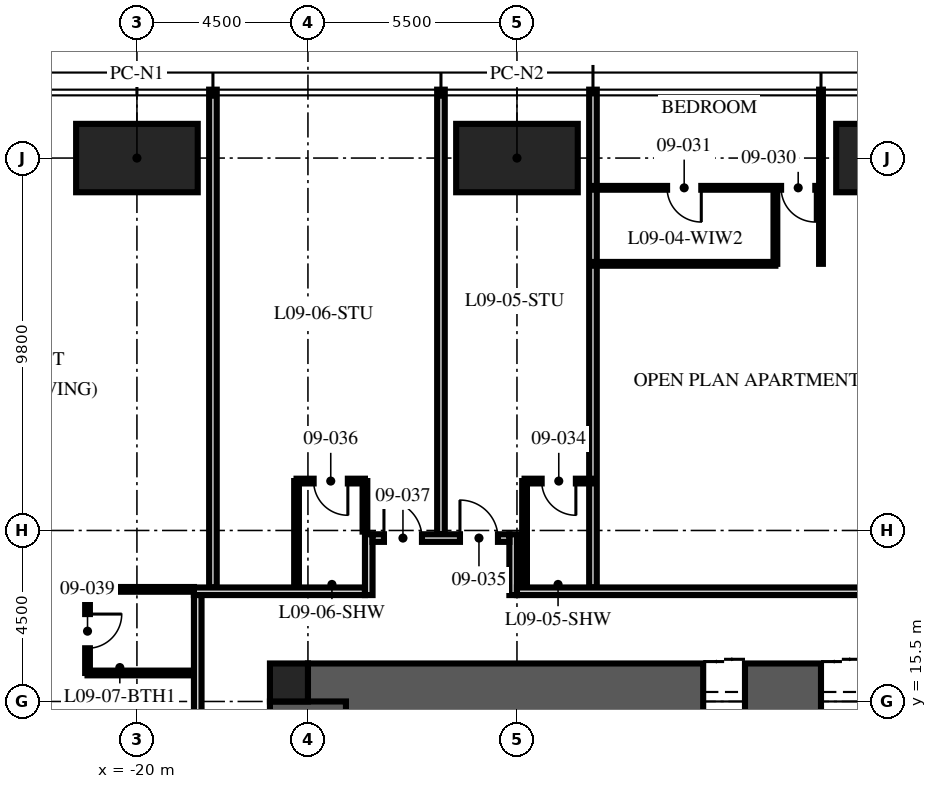
"""IFC4 building model, lengths in metres.
Left out: names, types, materials, properties, quantities, classifications, styles, units other than length and angle.
Written with IfcOpenShell. Run it as: python <this file> out.ifc"""

import sys

from ifc_helpers import new_model, si_unit, direction, frame, frame_2d, origin, origin_2d, place, context, subcontext, project, spatial, rectangle, hollow_rectangle, extrude, element, fill, save


model = new_model("IFC4")
c1 = context("Model", 3, precision=1e-05, world=origin(), true_north=direction((0.0, 1.0)))
c2 = subcontext(c1, "Body", "Model", "MODEL_VIEW")
j1 = project(units=[si_unit("LENGTHUNIT", "METRE"), si_unit("PLANEANGLEUNIT", "RADIAN")], contexts=[c1])
p1 = place(None, origin())
s1 = spatial("IfcSite", under=j1, at=p1, CompositionType="ELEMENT")
p2 = place(p1, origin())
s2 = spatial("IfcBuilding", under=s1, at=p2, CompositionType="ELEMENT")
p3 = place(p2, frame((0.0, 0.0, 39.75)))
s3 = spatial("IfcBuildingStorey", under=s2, at=p3, CompositionType="ELEMENT", Elevation=39.75)
p4 = place(p3, frame((-15.5, 15.5, -0.25), z_axis=(0.0, 0.0, 1.0), x_axis=(1.0, 0.0, 0.0)))
e1 = element("IfcWall", 1, at=p4, inside=s3, PredefinedType="SHEAR", context=c2, shape_type="SweptSolid", body=[
    extrude(rectangle(XDim=31.0, YDim=2.0, at=frame_2d((15.5, 0.0))), origin(), (0.0, 0.0, 1.0), 3.75),
])
p5 = place(p4, frame((10.4, 0.0, 0.25)))
e2 = element("IfcOpeningElement", 2, at=p5, cuts=e1, PredefinedType="OPENING", context=c2, shape_type="SweptSolid", body=[
    extrude(rectangle(XDim=1.1, YDim=2.1, at=frame_2d((0.55, 1.05))), frame((0.0, 1.01, 0.0), z_axis=(0.0, -1.0, 0.0), x_axis=(1.0, 0.0, 0.0)), (0.0, 0.0, 1.0), 2.02),
])
p6 = place(p4, frame((13.5, 0.0, 0.25)))
e3 = element("IfcOpeningElement", 3, at=p6, cuts=e1, PredefinedType="OPENING", context=c2, shape_type="SweptSolid", body=[
    extrude(rectangle(XDim=1.1, YDim=2.1, at=frame_2d((0.55, 1.05))), frame((0.0, 1.01, 0.0), z_axis=(0.0, -1.0, 0.0), x_axis=(1.0, 0.0, 0.0)), (0.0, 0.0, 1.0), 2.02),
])
p7 = place(p4, frame((16.6, 0.0, 0.25)))
e4 = element("IfcOpeningElement", 4, at=p7, cuts=e1, PredefinedType="OPENING", context=c2, shape_type="SweptSolid", body=[
    extrude(rectangle(XDim=1.1, YDim=2.1, at=frame_2d((0.55, 1.05))), frame((0.0, 1.01, 0.0), z_axis=(0.0, -1.0, 0.0), x_axis=(1.0, 0.0, 0.0)), (0.0, 0.0, 1.0), 2.02),
])
p8 = place(p3, frame((-15.5, -15.5, -0.25), z_axis=(0.0, 0.0, 1.0), x_axis=(0.0, 1.0, 0.0)))
e5 = element("IfcWall", 5, at=p8, inside=s3, PredefinedType="SHEAR", context=c2, shape_type="SweptSolid", body=[
    extrude(rectangle(XDim=31.0, YDim=2.0, at=frame_2d((15.5, 0.0))), origin(), (0.0, 0.0, 1.0), 3.75),
])
p9 = place(p8, frame((6.5, 0.0, 0.25)))
e6 = element("IfcOpeningElement", 6, at=p9, cuts=e5, PredefinedType="OPENING", context=c2, shape_type="SweptSolid", body=[
    extrude(rectangle(XDim=1.2, YDim=2.1, at=frame_2d((0.6, 1.05))), frame((0.0, 1.01, 0.0), z_axis=(0.0, -1.0, 0.0), x_axis=(1.0, 0.0, 0.0)), (0.0, 0.0, 1.0), 2.02),
])
p10 = place(p8, frame((23.0, 0.0, 0.25)))
e7 = element("IfcOpeningElement", 7, at=p10, cuts=e5, PredefinedType="OPENING", context=c2, shape_type="SweptSolid", body=[
    extrude(rectangle(XDim=1.8, YDim=2.1, at=frame_2d((0.9, 1.05))), frame((0.0, 1.01, 0.0), z_axis=(0.0, -1.0, 0.0), x_axis=(1.0, 0.0, 0.0)), (0.0, 0.0, 1.0), 2.02),
])
p11 = place(p3, frame((-16.0, 16.0, -0.25), z_axis=(0.0, 0.0, 1.0), x_axis=(1.0, 0.0, 0.0)))
e8 = element("IfcColumn", 8, at=p11, inside=s3, PredefinedType="COLUMN", context=c2, shape_type="SweptSolid", body=[
    extrude(rectangle(XDim=1.0, YDim=1.0, at=origin_2d()), origin(), (0.0, 0.0, 1.0), 3.75),
])
for number, where, z_axis, x_axis in (
    (9, (-20.0, 29.8, 0.0), (0.0, 0.0, 1.0), (1.0, 0.0, 0.0)),
    (10, (-10.0, 29.8, 0.0), (0.0, 0.0, 1.0), (1.0, 0.0, 0.0)),
    (11, (0.0, 29.8, 0.0), (0.0, 0.0, 1.0), (1.0, 0.0, 0.0)),
):
    element("IfcColumn", number, at=place(p3, frame(where, z_axis=z_axis, x_axis=x_axis)), inside=s3, PredefinedType="COLUMN", context=c2, shape_type="SweptSolid", body=[
        extrude(hollow_rectangle(XDim=3.2, YDim=1.8, WallThickness=0.2, at=origin_2d()), origin(), (0.0, 0.0, 1.0), 3.75),
    ])
p12 = place(p3, frame((-2.0, 27.017, 0.0), z_axis=(0.0, 0.0, 1.0), x_axis=(0.0, 1.0, 0.0)))
e12 = element("IfcWall", 12, at=p12, inside=s3, PredefinedType="PARTITIONING", context=c2, shape_type="SweptSolid", body=[
    extrude(rectangle(XDim=4.583, YDim=0.1, at=frame_2d((2.292, 0.0))), origin(), (0.0, 0.0, 1.0), 2.71),
])
p13 = place(p3, frame((-8.0, 18.5, 0.0), z_axis=(0.0, 0.0, 1.0), x_axis=(0.0, 1.0, 0.0)))
e13 = element("IfcWall", 13, at=p13, inside=s3, PredefinedType="PARTITIONING", context=c2, shape_type="SweptSolid", body=[
    extrude(rectangle(XDim=13.1, YDim=0.2, at=frame_2d((6.55, 0.0))), origin(), (0.0, 0.0, 1.0), 2.71),
])
p14 = place(p3, frame((-12.0, 19.9, 0.0), z_axis=(0.0, 0.0, 1.0), x_axis=(0.0, 1.0, 0.0)))
e14 = element("IfcWall", 14, at=p14, inside=s3, PredefinedType="PARTITIONING", context=c2, shape_type="SweptSolid", body=[
    extrude(rectangle(XDim=11.7, YDim=0.2, at=frame_2d((5.85, 0.0))), origin(), (0.0, 0.0, 1.0), 2.71),
])
p15 = place(p3, frame((-18.0, 18.5, 0.0), z_axis=(0.0, 0.0, 1.0), x_axis=(0.0, 1.0, 0.0)))
e15 = element("IfcWall", 15, at=p15, inside=s3, PredefinedType="PARTITIONING", context=c2, shape_type="SweptSolid", body=[
    extrude(rectangle(XDim=13.1, YDim=0.2, at=frame_2d((6.55, 0.0))), origin(), (0.0, 0.0, 1.0), 2.3),
])
p16 = place(p3, frame((-2.0, 29.017, 0.0), z_axis=(0.0, 0.0, 1.0), x_axis=(-1.0, 0.0, 0.0)))
e16 = element("IfcWall", 16, at=p16, inside=s3, PredefinedType="PARTITIONING", context=c2, shape_type="SweptSolid", body=[
    extrude(rectangle(XDim=6.0, YDim=0.1, at=frame_2d((3.0, 0.0))), origin(), (0.0, 0.0, 1.0), 2.61),
])
p17 = place(p16, frame((0.15, 0.0, 0.0)))
e17 = element("IfcOpeningElement", 17, at=p17, cuts=e16, PredefinedType="OPENING", context=c2, shape_type="SweptSolid", body=[
    extrude(rectangle(XDim=0.9, YDim=2.1, at=frame_2d((0.45, 1.05))), frame((0.0, 0.06, 0.0), z_axis=(0.0, -1.0, 0.0), x_axis=(1.0, 0.0, 0.0)), (0.0, 0.0, 1.0), 0.12),
])
p18 = place(p16, frame((3.15, 0.0, 0.0)))
e18 = element("IfcOpeningElement", 18, at=p18, cuts=e16, PredefinedType="OPENING", context=c2, shape_type="SweptSolid", body=[
    extrude(rectangle(XDim=0.9, YDim=2.1, at=frame_2d((0.45, 1.05))), frame((0.0, 0.06, 0.0), z_axis=(0.0, -1.0, 0.0), x_axis=(1.0, 0.0, 0.0)), (0.0, 0.0, 1.0), 0.12),
])
p19 = place(p3, frame((-3.2, 27.017, 0.0), z_axis=(0.0, 0.0, 1.0), x_axis=(0.0, 1.0, 0.0)))
e19 = element("IfcWall", 19, at=p19, inside=s3, PredefinedType="PARTITIONING", context=c2, shape_type="SweptSolid", body=[
    extrude(rectangle(XDim=2.0, YDim=0.1, at=frame_2d((1.0, 0.0))), origin(), (0.0, 0.0, 1.0), 3.5),
])
p20 = place(p3, frame((-3.2, 27.017, 0.0), z_axis=(0.0, 0.0, 1.0), x_axis=(-1.0, 0.0, 0.0)))
e20 = element("IfcWall", 20, at=p20, inside=s3, PredefinedType="PARTITIONING", context=c2, shape_type="SweptSolid", body=[
    extrude(rectangle(XDim=4.8, YDim=0.1, at=frame_2d((2.4, 0.0))), origin(), (0.0, 0.0, 1.0), 2.61),
])
p21 = place(p3, frame((-8.0, 21.3, 0.0), z_axis=(0.0, 0.0, 1.0), x_axis=(-1.0, 0.0, 0.0)))
e21 = element("IfcWall", 21, at=p21, inside=s3, PredefinedType="PARTITIONING", context=c2, shape_type="SweptSolid", body=[
    extrude(rectangle(XDim=1.8, YDim=0.125, at=frame_2d((0.9, 0.0))), origin(), (0.0, 0.0, 1.0), 3.5),
])
p22 = place(p21, frame((0.45, 0.0, 0.0)))
e22 = element("IfcOpeningElement", 22, at=p22, cuts=e21, PredefinedType="OPENING", context=c2, shape_type="SweptSolid", body=[
    extrude(rectangle(XDim=0.9, YDim=2.1, at=frame_2d((0.45, 1.05))), frame((0.0, 0.073, 0.0), z_axis=(0.0, -1.0, 0.0), x_axis=(1.0, 0.0, 0.0)), (0.0, 0.0, 1.0), 0.145),
])
p23 = place(p3, frame((-9.8, 18.5, 0.0), z_axis=(0.0, 0.0, 1.0), x_axis=(0.0, 1.0, 0.0)))
e23 = element("IfcWall", 23, at=p23, inside=s3, PredefinedType="PARTITIONING", context=c2, shape_type="SweptSolid", body=[
    extrude(rectangle(XDim=2.8, YDim=0.125, at=frame_2d((1.4, 0.0))), origin(), (0.0, 0.0, 1.0), 2.492),
])
p24 = place(p3, frame((-14.0, 21.3, 0.0), z_axis=(0.0, 0.0, 1.0), x_axis=(-1.0, 0.0, 0.0)))
e24 = element("IfcWall", 24, at=p24, inside=s3, PredefinedType="PARTITIONING", context=c2, shape_type="SweptSolid", body=[
    extrude(rectangle(XDim=1.8, YDim=0.125, at=frame_2d((0.9, 0.0))), origin(), (0.0, 0.0, 1.0), 2.61),
])
p25 = place(p24, frame((0.45, 0.0, 0.0)))
e25 = element("IfcOpeningElement", 25, at=p25, cuts=e24, PredefinedType="OPENING", context=c2, shape_type="SweptSolid", body=[
    extrude(rectangle(XDim=0.9, YDim=2.1, at=frame_2d((0.45, 1.05))), frame((0.0, 0.073, 0.0), z_axis=(0.0, -1.0, 0.0), x_axis=(1.0, 0.0, 0.0)), (0.0, 0.0, 1.0), 0.145),
])
p26 = place(p3, frame((-14.0, 19.97, 0.0), z_axis=(0.0, 0.0, 1.0), x_axis=(0.0, 1.0, 0.0)))
e26 = element("IfcWall", 26, at=p26, inside=s3, PredefinedType="PARTITIONING", context=c2, shape_type="SweptSolid", body=[
    extrude(rectangle(XDim=1.33, YDim=0.125, at=frame_2d((0.665, 0.0))), origin(), (0.0, 0.0, 1.0), 3.5),
])
p27 = place(p3, frame((-15.8, 18.5, 0.0), z_axis=(0.0, 0.0, 1.0), x_axis=(0.0, 1.0, 0.0)))
e27 = element("IfcWall", 27, at=p27, inside=s3, PredefinedType="PARTITIONING", context=c2, shape_type="SweptSolid", body=[
    extrude(rectangle(XDim=2.8, YDim=0.125, at=frame_2d((1.4, 0.0))), origin(), (0.0, 0.0, 1.0), 3.5),
])
p28 = place(p3, frame((-21.3, 18.45, 0.0), z_axis=(0.0, 0.0, 1.0), x_axis=(0.0, -1.0, 0.0)))
e28 = element("IfcWall", 28, at=p28, inside=s3, PredefinedType="PARTITIONING", context=c2, shape_type="SweptSolid", body=[
    extrude(rectangle(XDim=2.2, YDim=0.125, at=frame_2d((1.1, 0.0))), origin(), (0.0, 0.0, 1.0), 3.5),
])
p29 = place(p28, frame((0.65, 0.0, 0.0)))
e29 = element("IfcOpeningElement", 29, at=p29, cuts=e28, PredefinedType="OPENING", context=c2, shape_type="SweptSolid", body=[
    extrude(rectangle(XDim=0.9, YDim=2.1, at=frame_2d((0.45, 1.05))), frame((0.0, 0.073, 0.0), z_axis=(0.0, -1.0, 0.0), x_axis=(1.0, 0.0, 0.0)), (0.0, 0.0, 1.0), 0.145),
])
p30 = place(p3, frame((-18.5, 18.45, 0.0), z_axis=(0.0, 0.0, 1.0), x_axis=(-1.0, 0.0, 0.0)))
e30 = element("IfcWall", 30, at=p30, inside=s3, PredefinedType="PARTITIONING", context=c2, shape_type="SweptSolid", body=[
    extrude(rectangle(XDim=2.8, YDim=0.125, at=frame_2d((1.4, 0.0))), origin(), (0.0, 0.0, 1.0), 2.3),
])
p31 = place(p3, frame((-18.5, 16.25, 0.0), z_axis=(0.0, 0.0, 1.0), x_axis=(-1.0, 0.0, 0.0)))
e31 = element("IfcWall", 31, at=p31, inside=s3, PredefinedType="PARTITIONING", context=c2, shape_type="SweptSolid", body=[
    extrude(rectangle(XDim=2.8, YDim=0.125, at=frame_2d((1.4, 0.0))), origin(), (0.0, 0.0, 1.0), 3.5),
])
p32 = place(p3, frame((-18.5, 18.4, 0.0), z_axis=(0.0, 0.0, 1.0), x_axis=(1.0, 0.0, 0.0)))
e32 = element("IfcWall", 32, at=p32, inside=s3, PredefinedType="PARTITIONING", context=c2, shape_type="SweptSolid", body=[
    extrude(rectangle(XDim=4.5, YDim=0.2, at=frame_2d((2.25, 0.0))), origin(), (0.0, 0.0, 1.0), 2.3),
])
p33 = place(p3, frame((-13.9, 18.3, 0.0), z_axis=(0.0, 0.0, 1.0), x_axis=(0.0, 1.0, 0.0)))
e33 = element("IfcWall", 33, at=p33, inside=s3, PredefinedType="PARTITIONING", context=c2, shape_type="SweptSolid", body=[
    extrude(rectangle(XDim=1.6, YDim=0.2, at=frame_2d((0.8, 0.0))), origin(), (0.0, 0.0, 1.0), 3.5),
])
p34 = place(p3, frame((-10.1, 18.3, 0.0), z_axis=(0.0, 0.0, 1.0), x_axis=(0.0, 1.0, 0.0)))
e34 = element("IfcWall", 34, at=p34, inside=s3, PredefinedType="PARTITIONING", context=c2, shape_type="SweptSolid", body=[
    extrude(rectangle(XDim=1.6, YDim=0.2, at=frame_2d((0.8, 0.0))), origin(), (0.0, 0.0, 1.0), 2.492),
])
p35 = place(p3, frame((-13.8, 19.8, 0.0), z_axis=(0.0, 0.0, 1.0), x_axis=(1.0, 0.0, 0.0)))
e35 = element("IfcWall", 35, at=p35, inside=s3, PredefinedType="PARTITIONING", context=c2, shape_type="SweptSolid", body=[
    extrude(rectangle(XDim=3.6, YDim=0.2, at=frame_2d((1.8, 0.0))), origin(), (0.0, 0.0, 1.0), 3.5),
])
p36 = place(p35, frame((2.3, 0.0, 0.0)))
e36 = element("IfcOpeningElement", 36, at=p36, cuts=e35, PredefinedType="OPENING", context=c2, shape_type="SweptSolid", body=[
    extrude(rectangle(XDim=1.0, YDim=2.2, at=frame_2d((0.5, 1.1))), frame((0.0, 0.11, 0.0), z_axis=(0.0, -1.0, 0.0), x_axis=(1.0, 0.0, 0.0)), (0.0, 0.0, 1.0), 0.22),
])
p37 = place(p35, frame((0.3, 0.0, 0.0)))
e37 = element("IfcOpeningElement", 37, at=p37, cuts=e35, PredefinedType="OPENING", context=c2, shape_type="SweptSolid", body=[
    extrude(rectangle(XDim=1.0, YDim=2.2, at=frame_2d((0.5, 1.1))), frame((0.0, 0.11, 0.0), z_axis=(0.0, -1.0, 0.0), x_axis=(1.0, 0.0, 0.0)), (0.0, 0.0, 1.0), 0.22),
])
p38 = place(p3, frame((-10.0, 18.4, 0.0), z_axis=(0.0, 0.0, 1.0), x_axis=(1.0, 0.0, 0.0)))
e38 = element("IfcWall", 38, at=p38, inside=s3, PredefinedType="PARTITIONING", context=c2, shape_type="SweptSolid", body=[
    extrude(rectangle(XDim=16.0, YDim=0.2, at=frame_2d((8.0, 0.0))), origin(), (0.0, 0.0, 1.0), 2.492),
])
p39 = place(p3, frame((-18.4, 18.3, 0.0), z_axis=(0.0, 0.0, 1.0), x_axis=(0.0, -1.0, 0.0)))
e39 = element("IfcWall", 39, at=p39, inside=s3, PredefinedType="PARTITIONING", context=c2, shape_type="SweptSolid", body=[
    extrude(rectangle(XDim=36.6, YDim=0.2, at=frame_2d((18.3, 0.0))), origin(), (0.0, 0.0, 1.0), 2.3),
])
p40 = place(p39, frame((8.7, 0.0, 0.0)))
e40 = element("IfcOpeningElement", 40, at=p40, cuts=e39, PredefinedType="OPENING", context=c2, shape_type="SweptSolid", body=[
    extrude(rectangle(XDim=1.0, YDim=2.2, at=frame_2d((0.5, 1.1))), frame((0.0, 0.11, 0.0), z_axis=(0.0, -1.0, 0.0), x_axis=(1.0, 0.0, 0.0)), (0.0, 0.0, 1.0), 0.22),
])
p41 = place(p39, frame((14.87, 0.0, 0.0)))
e41 = element("IfcOpeningElement", 41, at=p41, cuts=e39, PredefinedType="OPENING", context=c2, shape_type="SweptSolid", body=[
    extrude(rectangle(XDim=1.0, YDim=2.2, at=frame_2d((0.5, 1.1))), frame((0.0, 0.11, 0.0), z_axis=(0.0, -1.0, 0.0), x_axis=(1.0, 0.0, 0.0)), (0.0, 0.0, 1.0), 0.22),
])
p42 = place(p39, frame((34.82, 0.0, 0.0)))
e42 = element("IfcOpeningElement", 42, at=p42, cuts=e39, PredefinedType="OPENING", context=c2, shape_type="SweptSolid", body=[
    extrude(rectangle(XDim=1.0, YDim=2.2, at=frame_2d((0.5, 1.1))), frame((0.0, 0.11, 0.0), z_axis=(0.0, -1.0, 0.0), x_axis=(1.0, 0.0, 0.0)), (0.0, 0.0, 1.0), 0.22),
])
p43 = place(p5, origin())
e43 = element("IfcDoor", 43, at=p43, inside=s3, OperationType="DOUBLE_DOOR_SLIDING", PredefinedType="DOOR", context=c2, shape_type="SweptSolid", body=[
    extrude(rectangle(XDim=1.1, YDim=2.1, at=frame_2d((0.55, 1.05))), frame((0.0, 0.025, 0.0), z_axis=(0.0, -1.0, 0.0), x_axis=(1.0, 0.0, 0.0)), (0.0, 0.0, 1.0), 0.05),
])
fill(e2, e43)
p44 = place(p6, origin())
e44 = element("IfcDoor", 44, at=p44, inside=s3, OperationType="DOUBLE_DOOR_SLIDING", PredefinedType="DOOR", context=c2, shape_type="SweptSolid", body=[
    extrude(rectangle(XDim=1.1, YDim=2.1, at=frame_2d((0.55, 1.05))), frame((0.0, 0.025, 0.0), z_axis=(0.0, -1.0, 0.0), x_axis=(1.0, 0.0, 0.0)), (0.0, 0.0, 1.0), 0.05),
])
fill(e3, e44)
p45 = place(p17, origin())
e45 = element("IfcDoor", 45, at=p45, inside=s3, OperationType="SINGLE_SWING_LEFT", PredefinedType="DOOR", context=c2, shape_type="SweptSolid", body=[
    extrude(rectangle(XDim=0.9, YDim=2.1, at=frame_2d((0.45, 1.05))), frame((0.0, 0.025, 0.0), z_axis=(0.0, -1.0, 0.0), x_axis=(1.0, 0.0, 0.0)), (0.0, 0.0, 1.0), 0.05),
])
fill(e17, e45)
p46 = place(p18, origin())
e46 = element("IfcDoor", 46, at=p46, inside=s3, OperationType="SINGLE_SWING_LEFT", PredefinedType="DOOR", context=c2, shape_type="SweptSolid", body=[
    extrude(rectangle(XDim=0.9, YDim=2.1, at=frame_2d((0.45, 1.05))), frame((0.0, 0.025, 0.0), z_axis=(0.0, -1.0, 0.0), x_axis=(1.0, 0.0, 0.0)), (0.0, 0.0, 1.0), 0.05),
])
fill(e18, e46)
p47 = place(p22, origin())
e47 = element("IfcDoor", 47, at=p47, inside=s3, OperationType="SINGLE_SWING_LEFT", PredefinedType="DOOR", context=c2, shape_type="SweptSolid", body=[
    extrude(rectangle(XDim=0.9, YDim=2.1, at=frame_2d((0.45, 1.05))), frame((0.0, 0.025, 0.0), z_axis=(0.0, -1.0, 0.0), x_axis=(1.0, 0.0, 0.0)), (0.0, 0.0, 1.0), 0.05),
])
fill(e22, e47)
p48 = place(p36, origin())
e48 = element("IfcDoor", 48, at=p48, inside=s3, OperationType="SINGLE_SWING_LEFT", PredefinedType="DOOR", context=c2, shape_type="SweptSolid", body=[
    extrude(rectangle(XDim=1.0, YDim=2.2, at=frame_2d((0.5, 1.1))), frame((0.0, 0.025, 0.0), z_axis=(0.0, -1.0, 0.0), x_axis=(1.0, 0.0, 0.0)), (0.0, 0.0, 1.0), 0.05),
])
fill(e36, e48)
p49 = place(p25, origin())
e49 = element("IfcDoor", 49, at=p49, inside=s3, OperationType="SINGLE_SWING_LEFT", PredefinedType="DOOR", context=c2, shape_type="SweptSolid", body=[
    extrude(rectangle(XDim=0.9, YDim=2.1, at=frame_2d((0.45, 1.05))), frame((0.0, 0.025, 0.0), z_axis=(0.0, -1.0, 0.0), x_axis=(1.0, 0.0, 0.0)), (0.0, 0.0, 1.0), 0.05),
])
fill(e25, e49)
p50 = place(p37, origin())
e50 = element("IfcDoor", 50, at=p50, inside=s3, OperationType="SINGLE_SWING_LEFT", PredefinedType="DOOR", context=c2, shape_type="SweptSolid", body=[
    extrude(rectangle(XDim=1.0, YDim=2.2, at=frame_2d((0.5, 1.1))), frame((0.0, 0.025, 0.0), z_axis=(0.0, -1.0, 0.0), x_axis=(1.0, 0.0, 0.0)), (0.0, 0.0, 1.0), 0.05),
])
fill(e37, e50)
p51 = place(p29, origin())
e51 = element("IfcDoor", 51, at=p51, inside=s3, OperationType="SINGLE_SWING_LEFT", PredefinedType="DOOR", context=c2, shape_type="SweptSolid", body=[
    extrude(rectangle(XDim=0.9, YDim=2.1, at=frame_2d((0.45, 1.05))), frame((0.0, 0.025, 0.0), z_axis=(0.0, -1.0, 0.0), x_axis=(1.0, 0.0, 0.0)), (0.0, 0.0, 1.0), 0.05),
])
fill(e29, e51)
save(model, sys.argv[1])
